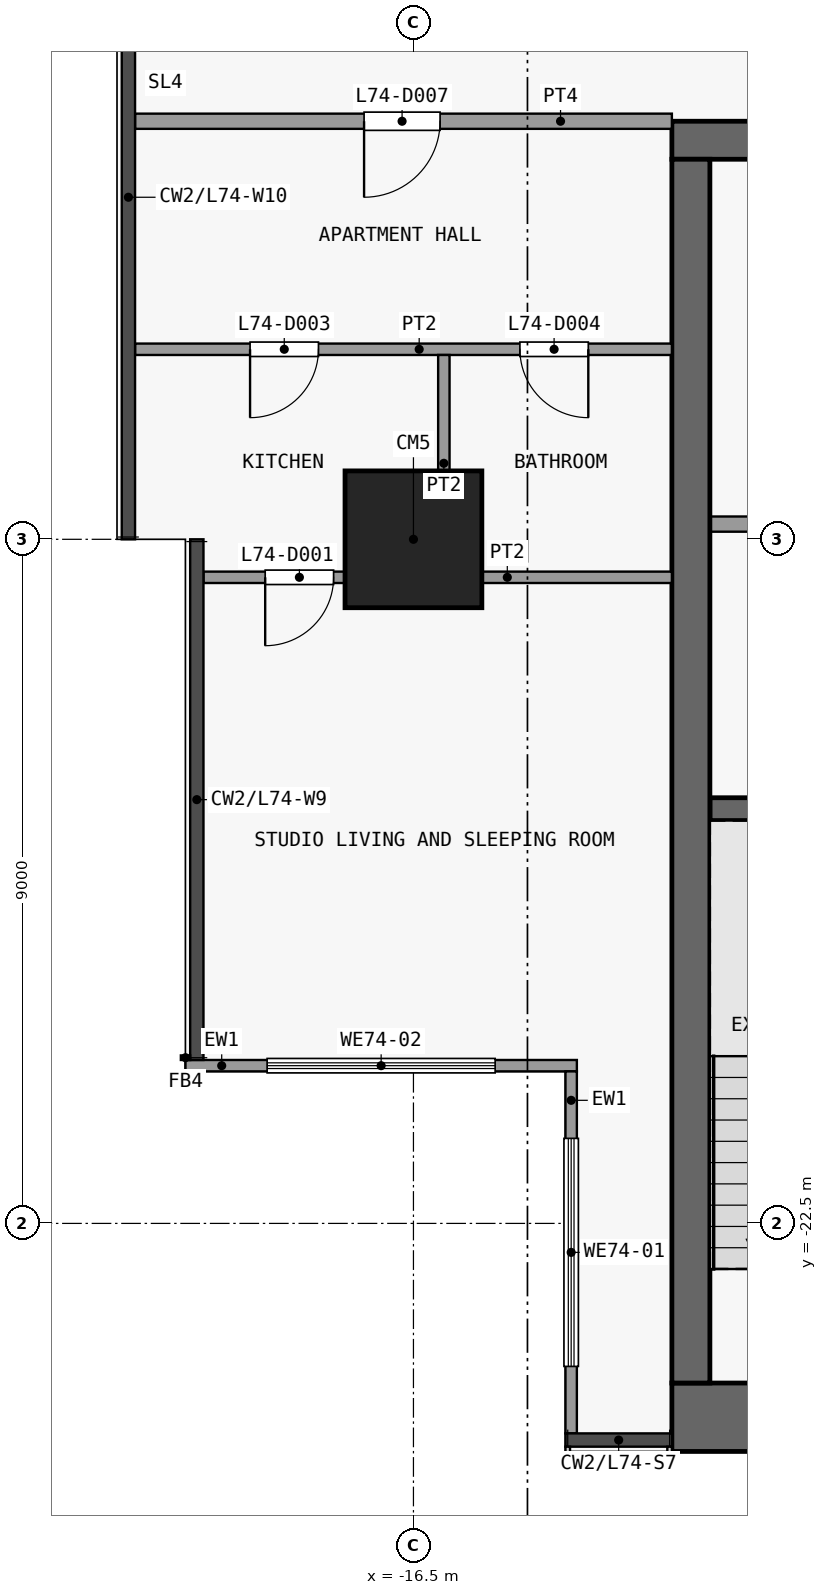
"""IFC4 building model, lengths in metres.
Left out: names, types, materials, properties, quantities, classifications, styles, units other than length and angle.
Written with IfcOpenShell. Run it as: python <this file> out.ifc"""

import sys

from ifc_helpers import new_model, si_unit, direction, frame, frame_2d, origin, origin_2d, place, context, subcontext, project, spatial, rectangle, extrude, element, fill, save


model = new_model("IFC4")
c1 = context("Model", 3, precision=1e-05, world=origin(), true_north=direction((0.0, 1.0)))
c2 = subcontext(c1, "Body", "Model", "MODEL_VIEW")
j1 = project(units=[si_unit("LENGTHUNIT", "METRE"), si_unit("PLANEANGLEUNIT", "RADIAN")], contexts=[c1])
p1 = place(None, origin())
s1 = spatial("IfcSite", under=j1, at=p1, CompositionType="ELEMENT")
p2 = place(p1, origin())
s2 = spatial("IfcBuilding", under=s1, at=p2, CompositionType="ELEMENT")
p3 = place(p2, frame((0.0, 0.0, 291.5)))
s3 = spatial("IfcBuildingStorey", under=s2, at=p3, CompositionType="ELEMENT", Elevation=291.5)
p4 = place(p3, frame((-16.5, -13.5, 0.0), z_axis=(0.0, 0.0, 1.0), x_axis=(1.0, 0.0, 0.0)))
e1 = element("IfcColumn", 1, at=p4, inside=s3, PredefinedType="COLUMN", context=c2, shape_type="SweptSolid", body=[
    extrude(rectangle(XDim=1.8, YDim=1.8, at=origin_2d()), origin(), (0.0, 0.0, 1.0), 3.6),
])
p5 = place(p3, frame((-13.1, -25.05, 0.0), z_axis=(0.0, 0.0, 1.0), x_axis=(1.0, 0.0, 0.0)))
e2 = element("IfcWall", 2, at=p5, inside=s3, PredefinedType="SHEAR", context=c2, shape_type="SweptSolid", body=[
    extrude(rectangle(XDim=26.2, YDim=0.9, at=frame_2d((13.1, 0.0))), origin(), (0.0, 0.0, 1.0), 3.3),
])
p6 = place(p3, frame((-13.1, -8.25, 0.0), z_axis=(0.0, 0.0, 1.0), x_axis=(1.0, 0.0, 0.0)))
e3 = element("IfcWall", 3, at=p6, inside=s3, PredefinedType="SHEAR", context=c2, shape_type="SweptSolid", body=[
    extrude(rectangle(XDim=26.2, YDim=0.5, at=frame_2d((13.1, 0.0))), origin(), (0.0, 0.0, 1.0), 3.3),
])
p7 = place(p6, frame((7.4, 0.0, 0.0)))
e4 = element("IfcOpeningElement", 4, at=p7, cuts=e3, PredefinedType="OPENING", context=c2, shape_type="SweptSolid", body=[
    extrude(rectangle(XDim=1.8, YDim=2.1, at=frame_2d((0.9, 1.05))), frame((0.0, 0.26, 0.0), z_axis=(0.0, -1.0, 0.0), x_axis=(1.0, 0.0, 0.0)), (0.0, 0.0, 1.0), 0.52),
])
p8 = place(p6, frame((17.0, 0.0, 0.0)))
e5 = element("IfcOpeningElement", 5, at=p8, cuts=e3, PredefinedType="OPENING", context=c2, shape_type="SweptSolid", body=[
    extrude(rectangle(XDim=1.8, YDim=2.1, at=frame_2d((0.9, 1.05))), frame((0.0, 0.26, 0.0), z_axis=(0.0, -1.0, 0.0), x_axis=(1.0, 0.0, 0.0)), (0.0, 0.0, 1.0), 0.52),
])
p9 = place(p6, frame((2.325, 0.0, 0.0)))
e6 = element("IfcOpeningElement", 6, at=p9, cuts=e3, PredefinedType="OPENING", context=c2, shape_type="SweptSolid", body=[
    extrude(rectangle(XDim=0.9, YDim=2.1, at=frame_2d((0.45, 1.05))), frame((0.0, 0.26, 0.0), z_axis=(0.0, -1.0, 0.0), x_axis=(1.0, 0.0, 0.0)), (0.0, 0.0, 1.0), 0.52),
])
p10 = place(p6, frame((22.975, 0.0, 0.0)))
e7 = element("IfcOpeningElement", 7, at=p10, cuts=e3, PredefinedType="OPENING", context=c2, shape_type="SweptSolid", body=[
    extrude(rectangle(XDim=0.9, YDim=2.1, at=frame_2d((0.45, 1.05))), frame((0.0, 0.26, 0.0), z_axis=(0.0, -1.0, 0.0), x_axis=(1.0, 0.0, 0.0)), (0.0, 0.0, 1.0), 0.52),
])
p11 = place(p3, frame((-12.85, -24.6, 0.0), z_axis=(0.0, 0.0, 1.0), x_axis=(0.0, 1.0, 0.0)))
e8 = element("IfcWall", 8, at=p11, inside=s3, PredefinedType="SHEAR", context=c2, shape_type="SweptSolid", body=[
    extrude(rectangle(XDim=16.1, YDim=0.5, at=frame_2d((8.05, 0.0))), origin(), (0.0, 0.0, 1.0), 3.3),
])
p12 = place(p3, frame((-12.6, -17.05, 0.0), z_axis=(0.0, 0.0, 1.0), x_axis=(1.0, 0.0, 0.0)))
e9 = element("IfcWall", 9, at=p12, inside=s3, PredefinedType="SHEAR", context=c2, shape_type="SweptSolid", body=[
    extrude(rectangle(XDim=3.1, YDim=0.3, at=frame_2d((1.55, 0.0))), origin(), (0.0, 0.0, 1.0), 3.3),
])
p13 = place(p3, frame((-12.6, -13.3, 0.0), z_axis=(0.0, 0.0, 1.0), x_axis=(1.0, 0.0, 0.0)))
e10 = element("IfcWall", 10, at=p13, inside=s3, PredefinedType="PARTITIONING", context=c2, shape_type="SweptSolid", body=[
    extrude(rectangle(XDim=1.45, YDim=0.2, at=frame_2d((0.725, 0.0))), origin(), (0.0, 0.0, 1.0), 3.3),
])
p14 = place(p3, frame((-14.425, -25.262, 0.0), z_axis=(0.0, 0.0, 1.0), x_axis=(0.0, 1.0, 0.0)))
e11 = element("IfcWall", 11, at=p14, inside=s3, PredefinedType="SOLIDWALL", context=c2, shape_type="SweptSolid", body=[
    extrude(rectangle(XDim=4.762, YDim=0.15, at=frame_2d((2.381, 0.0))), origin(), (0.0, 0.0, 1.0), 3.3),
])
p15 = place(p14, frame((0.881, 0.0, 0.9)))
e12 = element("IfcOpeningElement", 12, at=p15, cuts=e11, PredefinedType="OPENING", context=c2, shape_type="SweptSolid", body=[
    extrude(rectangle(XDim=3.0, YDim=2.4, at=frame_2d((1.5, 1.2))), frame((0.0, 0.085, 0.0), z_axis=(0.0, -1.0, 0.0), x_axis=(1.0, 0.0, 0.0)), (0.0, 0.0, 1.0), 0.17),
])
p16 = place(p3, frame((-14.35, -20.425, 0.0), z_axis=(0.0, 0.0, 1.0), x_axis=(-1.0, 0.0, 0.0)))
e13 = element("IfcWall", 13, at=p16, inside=s3, PredefinedType="SOLIDWALL", context=c2, shape_type="SweptSolid", body=[
    extrude(rectangle(XDim=5.15, YDim=0.15, at=frame_2d((2.575, 0.0))), origin(), (0.0, 0.0, 1.0), 3.3),
])
p17 = place(p16, frame((1.075, 0.0, 0.9)))
e14 = element("IfcOpeningElement", 14, at=p17, cuts=e13, PredefinedType="OPENING", context=c2, shape_type="SweptSolid", body=[
    extrude(rectangle(XDim=3.0, YDim=2.4, at=frame_2d((1.5, 1.2))), frame((0.0, 0.085, 0.0), z_axis=(0.0, -1.0, 0.0), x_axis=(1.0, 0.0, 0.0)), (0.0, 0.0, 1.0), 0.17),
])
p18 = place(p3, frame((-19.262, -14.0, 0.0), z_axis=(0.0, 0.0, 1.0), x_axis=(1.0, 0.0, 0.0)))
e15 = element("IfcWall", 15, at=p18, inside=s3, PredefinedType="PARTITIONING", context=c2, shape_type="SweptSolid", body=[
    extrude(rectangle(XDim=6.162, YDim=0.15, at=frame_2d((3.081, 0.0))), origin(), (0.0, 0.0, 1.0), 3.3),
])
p19 = place(p18, frame((0.812, 0.0, 0.0)))
e16 = element("IfcOpeningElement", 16, at=p19, cuts=e15, PredefinedType="OPENING", context=c2, shape_type="SweptSolid", body=[
    extrude(rectangle(XDim=0.9, YDim=2.1, at=frame_2d((0.45, 1.05))), frame((0.0, 0.085, 0.0), z_axis=(0.0, -1.0, 0.0), x_axis=(1.0, 0.0, 0.0)), (0.0, 0.0, 1.0), 0.17),
])
p20 = place(p3, frame((-20.163, -11.0, 0.0), z_axis=(0.0, 0.0, 1.0), x_axis=(1.0, 0.0, 0.0)))
e17 = element("IfcWall", 17, at=p20, inside=s3, PredefinedType="PARTITIONING", context=c2, shape_type="SweptSolid", body=[
    extrude(rectangle(XDim=7.062, YDim=0.15, at=frame_2d((3.531, 0.0))), origin(), (0.0, 0.0, 1.0), 3.3),
])
p21 = place(p20, frame((1.513, 0.0, 0.0)))
e18 = element("IfcOpeningElement", 18, at=p21, cuts=e17, PredefinedType="OPENING", context=c2, shape_type="SweptSolid", body=[
    extrude(rectangle(XDim=0.9, YDim=2.1, at=frame_2d((0.45, 1.05))), frame((0.0, 0.085, 0.0), z_axis=(0.0, -1.0, 0.0), x_axis=(1.0, 0.0, 0.0)), (0.0, 0.0, 1.0), 0.17),
])
p22 = place(p20, frame((5.063, 0.0, 0.0)))
e19 = element("IfcOpeningElement", 19, at=p22, cuts=e17, PredefinedType="OPENING", context=c2, shape_type="SweptSolid", body=[
    extrude(rectangle(XDim=0.9, YDim=2.1, at=frame_2d((0.45, 1.05))), frame((0.0, 0.085, 0.0), z_axis=(0.0, -1.0, 0.0), x_axis=(1.0, 0.0, 0.0)), (0.0, 0.0, 1.0), 0.17),
])
p23 = place(p3, frame((-20.163, -8.0, 0.0), z_axis=(0.0, 0.0, 1.0), x_axis=(1.0, 0.0, 0.0)))
e20 = element("IfcWall", 20, at=p23, inside=s3, PredefinedType="PARTITIONING", context=c2, shape_type="SweptSolid", body=[
    extrude(rectangle(XDim=7.062, YDim=0.2, at=frame_2d((3.531, 0.0))), origin(), (0.0, 0.0, 1.0), 3.3),
])
p24 = place(p23, frame((3.013, 0.0, 0.0)))
e21 = element("IfcOpeningElement", 21, at=p24, cuts=e20, PredefinedType="OPENING", context=c2, shape_type="SweptSolid", body=[
    extrude(rectangle(XDim=1.0, YDim=2.1, at=frame_2d((0.5, 1.05))), frame((0.0, 0.11, 0.0), z_axis=(0.0, -1.0, 0.0), x_axis=(1.0, 0.0, 0.0)), (0.0, 0.0, 1.0), 0.22),
])
p25 = place(p3, frame((-16.1, -13.925, 0.0), z_axis=(0.0, 0.0, 1.0), x_axis=(0.0, 1.0, 0.0)))
e22 = element("IfcWall", 22, at=p25, inside=s3, PredefinedType="PARTITIONING", context=c2, shape_type="SweptSolid", body=[
    extrude(rectangle(XDim=2.85, YDim=0.15, at=frame_2d((1.425, 0.0))), origin(), (0.0, 0.0, 1.0), 3.3),
])
p26 = place(p15, origin())
e23 = element("IfcWindow", 23, at=p26, inside=s3, PartitioningType="SINGLE_PANEL", PredefinedType="WINDOW", context=c2, shape_type="SweptSolid", body=[
    extrude(rectangle(XDim=3.0, YDim=2.4, at=frame_2d((1.5, 1.2))), frame((0.0, 0.03, 0.0), z_axis=(0.0, -1.0, 0.0), x_axis=(1.0, 0.0, 0.0)), (0.0, 0.0, 1.0), 0.06),
])
fill(e12, e23)
p27 = place(p17, origin())
e24 = element("IfcWindow", 24, at=p27, inside=s3, PartitioningType="SINGLE_PANEL", PredefinedType="WINDOW", context=c2, shape_type="SweptSolid", body=[
    extrude(rectangle(XDim=3.0, YDim=2.4, at=frame_2d((1.5, 1.2))), frame((0.0, 0.03, 0.0), z_axis=(0.0, -1.0, 0.0), x_axis=(1.0, 0.0, 0.0)), (0.0, 0.0, 1.0), 0.06),
])
fill(e14, e24)
p28 = place(p19, origin())
e25 = element("IfcDoor", 25, at=p28, inside=s3, OperationType="SINGLE_SWING_LEFT", PredefinedType="DOOR", context=c2, shape_type="SweptSolid", body=[
    extrude(rectangle(XDim=0.9, YDim=2.1, at=frame_2d((0.45, 1.05))), frame((0.0, 0.025, 0.0), z_axis=(0.0, -1.0, 0.0), x_axis=(1.0, 0.0, 0.0)), (0.0, 0.0, 1.0), 0.05),
])
fill(e16, e25)
p29 = place(p21, origin())
e26 = element("IfcDoor", 26, at=p29, inside=s3, OperationType="SINGLE_SWING_LEFT", PredefinedType="DOOR", context=c2, shape_type="SweptSolid", body=[
    extrude(rectangle(XDim=0.9, YDim=2.1, at=frame_2d((0.45, 1.05))), frame((0.0, 0.025, 0.0), z_axis=(0.0, -1.0, 0.0), x_axis=(1.0, 0.0, 0.0)), (0.0, 0.0, 1.0), 0.05),
])
fill(e18, e26)
p30 = place(p22, origin())
e27 = element("IfcDoor", 27, at=p30, inside=s3, OperationType="SINGLE_SWING_RIGHT", PredefinedType="DOOR", context=c2, shape_type="SweptSolid", body=[
    extrude(rectangle(XDim=0.9, YDim=2.1, at=frame_2d((0.45, 1.05))), frame((0.0, 0.025, 0.0), z_axis=(0.0, -1.0, 0.0), x_axis=(1.0, 0.0, 0.0)), (0.0, 0.0, 1.0), 0.05),
])
fill(e19, e27)
p31 = place(p24, origin())
e28 = element("IfcDoor", 28, at=p31, inside=s3, OperationType="SINGLE_SWING_LEFT", PredefinedType="DOOR", context=c2, shape_type="SweptSolid", body=[
    extrude(rectangle(XDim=1.0, YDim=2.1, at=frame_2d((0.5, 1.05))), frame((0.0, 0.025, 0.0), z_axis=(0.0, -1.0, 0.0), x_axis=(1.0, 0.0, 0.0)), (0.0, 0.0, 1.0), 0.05),
])
fill(e21, e28)
save(model, sys.argv[1])
